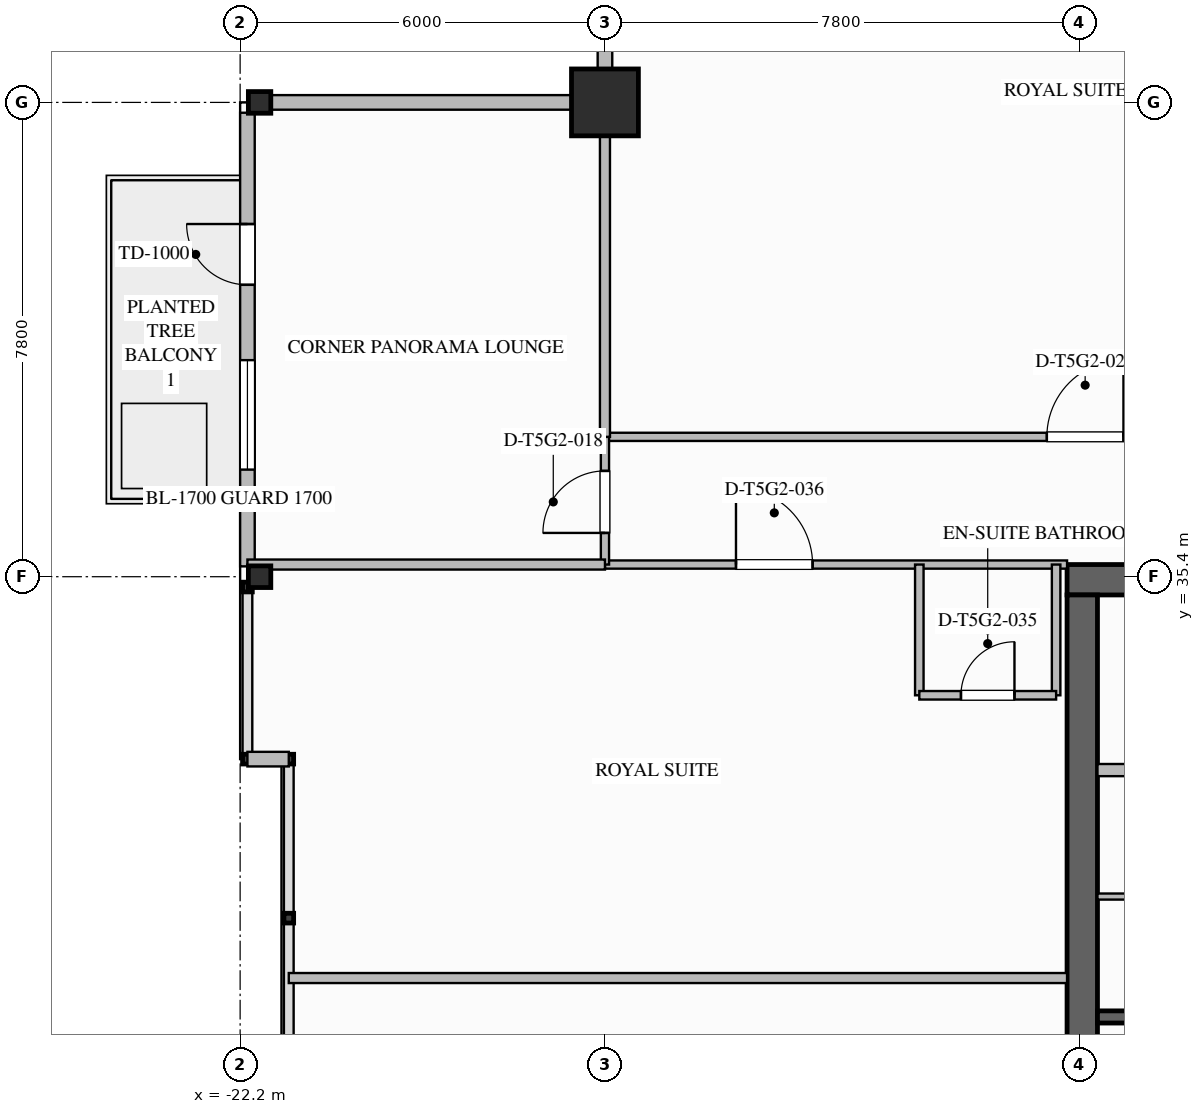
"""IFC4 building model, lengths in metres.
Left out: names, types, materials, properties, quantities, classifications, styles, units other than length and angle.
Written with IfcOpenShell. Run it as: python <this file> out.ifc"""

import sys

from ifc_helpers import new_model, si_unit, direction, frame, frame_2d, origin, origin_2d, place, context, subcontext, project, spatial, rectangle, i_section, extrude, element, fill, save


model = new_model("IFC4")
c1 = context("Model", 3, precision=1e-05, world=origin(), true_north=direction((0.0, 1.0)))
c2 = subcontext(c1, "Body", "Model", "MODEL_VIEW")
j1 = project(units=[si_unit("LENGTHUNIT", "METRE"), si_unit("PLANEANGLEUNIT", "RADIAN")], contexts=[c1])
p1 = place(None, origin())
s1 = spatial("IfcSite", under=j1, at=p1, CompositionType="ELEMENT")
p2 = place(p1, origin())
s2 = spatial("IfcBuilding", under=s1, at=p2, CompositionType="ELEMENT")
p3 = place(p2, frame((0.0, 0.0, 275.95)))
s3 = spatial("IfcBuildingStorey", under=s2, at=p3, CompositionType="ELEMENT", Elevation=275.95)
p4 = place(p3, frame((-8.6, 35.35, 0.0), z_axis=(0.0, 0.0, 1.0), x_axis=(1.0, 0.0, 0.0)))
e1 = element("IfcWall", 1, at=p4, inside=s3, PredefinedType="SHEAR", context=c2, shape_type="SweptSolid", body=[
    extrude(rectangle(XDim=17.2, YDim=0.5, at=frame_2d((8.6, 0.0))), origin(), (0.0, 0.0, 1.0), 3.65),
])
p5 = place(p3, frame((-8.35, 18.9, 0.0), z_axis=(0.0, 0.0, 1.0), x_axis=(0.0, 1.0, 0.0)))
e2 = element("IfcWall", 2, at=p5, inside=s3, PredefinedType="SHEAR", context=c2, shape_type="SweptSolid", body=[
    extrude(rectangle(XDim=16.2, YDim=0.5, at=frame_2d((8.1, 0.0))), origin(), (0.0, 0.0, 1.0), 3.65),
])
p6 = place(p3, frame((-16.2, 43.2, 0.0), z_axis=(0.0, 0.0, 1.0), x_axis=(1.0, 0.0, 0.0)))
e3 = element("IfcColumn", 3, at=p6, inside=s3, PredefinedType="COLUMN", context=c2, shape_type="SweptSolid", body=[
    extrude(rectangle(XDim=1.1, YDim=1.1, at=origin_2d()), origin(), (0.0, 0.0, 1.0), 3.65),
])
for number, where, z_axis, x_axis in (
    (4, (-21.88, 35.4, 0.0), (0.0, 0.0, 1.0), (1.0, 0.0, 0.0)),
    (5, (-21.88, 43.2, 0.0), (0.0, 0.0, 1.0), (1.0, 0.0, 0.0)),
):
    element("IfcColumn", number, at=place(p3, frame(where, z_axis=z_axis, x_axis=x_axis)), inside=s3, PredefinedType="COLUMN", context=c2, shape_type="SweptSolid", body=[
        extrude(i_section(OverallWidth=0.369, OverallDepth=0.356, WebThickness=0.011, FlangeThickness=0.018, FilletRadius=0.025, at=origin_2d()), origin(), (0.0, 0.0, 1.0), 3.647),
    ])
p7 = place(p3, frame((-22.08, 35.57, 0.0), z_axis=(0.0, 0.0, 1.0), x_axis=(0.0, 1.0, 0.0)))
e6 = element("IfcWall", 6, at=p7, inside=s3, PredefinedType="STANDARD", context=c2, shape_type="SweptSolid", body=[
    extrude(rectangle(XDim=7.46, YDim=0.24, at=frame_2d((3.73, 0.0))), origin(), (0.0, 0.0, 1.0), 2.853),
])
p8 = place(p7, frame((4.63, 0.0, 0.0)))
e7 = element("IfcOpeningElement", 7, at=p8, cuts=e6, PredefinedType="OPENING", context=c2, shape_type="SweptSolid", body=[
    extrude(rectangle(XDim=1.0, YDim=2.2, at=frame_2d((0.5, 1.1))), frame((0.0, 0.13, 0.0), z_axis=(0.0, -1.0, 0.0), x_axis=(1.0, 0.0, 0.0)), (0.0, 0.0, 1.0), 0.26),
])
p9 = place(p7, frame((1.592, 0.0, 0.75)))
e8 = element("IfcOpeningElement", 8, at=p9, cuts=e6, PredefinedType="OPENING", context=c2, shape_type="SweptSolid", body=[
    extrude(rectangle(XDim=1.8, YDim=2.003, at=frame_2d((0.9, 1.001))), frame((0.0, 0.13, 0.0), z_axis=(0.0, -1.0, 0.0), x_axis=(1.0, 0.0, 0.0)), (0.0, 0.0, 1.0), 0.26),
])
for number, where, z_axis, x_axis in (
    (9, (-22.08, 43.2, 0.0), (0.0, 0.0, 1.0), (1.0, 0.0, 0.0)),
    (10, (-16.2, 43.2, 0.0), (0.0, 0.0, 1.0), (0.0, 1.0, 0.0)),
):
    element("IfcWall", number, at=place(p3, frame(where, z_axis=z_axis, x_axis=x_axis)), inside=s3, PredefinedType="STANDARD", context=c2, shape_type="SweptSolid", body=[
        extrude(rectangle(XDim=5.88, YDim=0.24, at=frame_2d((2.94, 0.0))), origin(), (0.0, 0.0, 1.0), 2.779),
    ])
p10 = place(p3, frame((-21.4, 32.4, 0.0), z_axis=(0.0, 0.0, 1.0), x_axis=(-1.0, 0.0, 0.0)))
e11 = element("IfcWall", 11, at=p10, inside=s3, PredefinedType="STANDARD", context=c2, shape_type="SweptSolid", body=[
    extrude(rectangle(XDim=0.68, YDim=0.24, at=frame_2d((0.34, 0.0))), origin(), (0.0, 0.0, 1.0), 3.39),
])
p11 = place(p3, frame((-8.1, 28.16, 0.0), z_axis=(0.0, 0.0, 1.0), x_axis=(1.0, 0.0, 0.0)))
e12 = element("IfcWall", 12, at=p11, inside=s3, PredefinedType="SOLIDWALL", context=c2, shape_type="SweptSolid", body=[
    extrude(rectangle(XDim=8.1, YDim=0.2, at=frame_2d((4.05, 0.0))), origin(), (0.0, 0.0, 1.0), 3.39),
])
p12 = place(p3, frame((-8.1, 32.22, 0.0), z_axis=(0.0, 0.0, 1.0), x_axis=(1.0, 0.0, 0.0)))
e13 = element("IfcWall", 13, at=p12, inside=s3, PredefinedType="SOLIDWALL", context=c2, shape_type="SweptSolid", body=[
    extrude(rectangle(XDim=7.1, YDim=0.2, at=frame_2d((3.55, 0.0))), origin(), (0.0, 0.0, 1.0), 3.39),
])
p13 = place(p12, frame((0.95, 0.0, 0.0)))
e14 = element("IfcOpeningElement", 14, at=p13, cuts=e13, PredefinedType="OPENING", context=c2, shape_type="SweptSolid", body=[
    extrude(rectangle(XDim=1.1, YDim=2.2, at=frame_2d((0.55, 1.1))), frame((0.0, 0.11, 0.0), z_axis=(0.0, -1.0, 0.0), x_axis=(1.0, 0.0, 0.0)), (0.0, 0.0, 1.0), 0.22),
])
p14 = place(p12, frame((3.27, 0.0, 0.0)))
e15 = element("IfcOpeningElement", 15, at=p14, cuts=e13, PredefinedType="OPENING", context=c2, shape_type="SweptSolid", body=[
    extrude(rectangle(XDim=1.1, YDim=2.2, at=frame_2d((0.55, 1.1))), frame((0.0, 0.11, 0.0), z_axis=(0.0, -1.0, 0.0), x_axis=(1.0, 0.0, 0.0)), (0.0, 0.0, 1.0), 0.22),
])
p15 = place(p12, frame((5.59, 0.0, 0.0)))
e16 = element("IfcOpeningElement", 16, at=p15, cuts=e13, PredefinedType="OPENING", context=c2, shape_type="SweptSolid", body=[
    extrude(rectangle(XDim=1.1, YDim=2.2, at=frame_2d((0.55, 1.1))), frame((0.0, 0.11, 0.0), z_axis=(0.0, -1.0, 0.0), x_axis=(1.0, 0.0, 0.0)), (0.0, 0.0, 1.0), 0.22),
])
p16 = place(p3, frame((-8.1, 30.14, 0.0), z_axis=(0.0, 0.0, 1.0), x_axis=(1.0, 0.0, 0.0)))
e17 = element("IfcWall", 17, at=p16, inside=s3, PredefinedType="PARTITIONING", context=c2, shape_type="SweptSolid", body=[
    extrude(rectangle(XDim=7.1, YDim=0.1, at=frame_2d((3.55, 0.0))), origin(), (0.0, 0.0, 1.0), 3.39),
])
p17 = place(p16, frame((2.8, 0.0, 0.0)))
e18 = element("IfcOpeningElement", 18, at=p17, cuts=e17, PredefinedType="OPENING", context=c2, shape_type="SweptSolid", body=[
    extrude(rectangle(XDim=0.92, YDim=2.1, at=frame_2d((0.46, 1.05))), frame((0.0, 0.06, 0.0), z_axis=(0.0, -1.0, 0.0), x_axis=(1.0, 0.0, 0.0)), (0.0, 0.0, 1.0), 0.12),
])
p18 = place(p3, frame((-16.2, 37.7, 0.0), z_axis=(0.0, 0.0, 1.0), x_axis=(1.0, 0.0, 0.0)))
e19 = element("IfcWall", 19, at=p18, inside=s3, PredefinedType="PARTITIONING", context=c2, shape_type="SweptSolid", body=[
    extrude(rectangle(XDim=38.28, YDim=0.135, at=frame_2d((19.14, 0.0))), origin(), (0.0, 0.0, 1.0), 3.39),
])
p19 = place(p18, frame((33.355, 0.0, 0.0)))
e20 = element("IfcOpeningElement", 20, at=p19, cuts=e19, PredefinedType="OPENING", context=c2, shape_type="SweptSolid", body=[
    extrude(rectangle(XDim=1.26, YDim=2.2, at=frame_2d((0.63, 1.1))), frame((0.0, 0.077, 0.0), z_axis=(0.0, -1.0, 0.0), x_axis=(1.0, 0.0, 0.0)), (0.0, 0.0, 1.0), 0.155),
])
p20 = place(p18, frame((7.268, 0.0, 0.0)))
e21 = element("IfcOpeningElement", 21, at=p20, cuts=e19, PredefinedType="OPENING", context=c2, shape_type="SweptSolid", body=[
    extrude(rectangle(XDim=1.26, YDim=2.2, at=frame_2d((0.63, 1.1))), frame((0.0, 0.077, 0.0), z_axis=(0.0, -1.0, 0.0), x_axis=(1.0, 0.0, 0.0)), (0.0, 0.0, 1.0), 0.155),
])
p21 = place(p18, frame((23.468, 0.0, 0.0)))
e22 = element("IfcOpeningElement", 22, at=p21, cuts=e19, PredefinedType="OPENING", context=c2, shape_type="SweptSolid", body=[
    extrude(rectangle(XDim=1.26, YDim=2.2, at=frame_2d((0.63, 1.1))), frame((0.0, 0.077, 0.0), z_axis=(0.0, -1.0, 0.0), x_axis=(1.0, 0.0, 0.0)), (0.0, 0.0, 1.0), 0.155),
])
p22 = place(p3, frame((-16.2, 35.6, 0.0), z_axis=(0.0, 0.0, 1.0), x_axis=(1.0, 0.0, 0.0)))
e23 = element("IfcWall", 23, at=p22, inside=s3, PredefinedType="PARTITIONING", context=c2, shape_type="SweptSolid", body=[
    extrude(rectangle(XDim=7.6, YDim=0.135, at=frame_2d((3.8, 0.0))), origin(), (0.0, 0.0, 1.0), 2.767),
])
p23 = place(p22, frame((2.155, 0.0, 0.0)))
e24 = element("IfcOpeningElement", 24, at=p23, cuts=e23, PredefinedType="OPENING", context=c2, shape_type="SweptSolid", body=[
    extrude(rectangle(XDim=1.26, YDim=2.2, at=frame_2d((0.63, 1.1))), frame((0.0, 0.077, 0.0), z_axis=(0.0, -1.0, 0.0), x_axis=(1.0, 0.0, 0.0)), (0.0, 0.0, 1.0), 0.155),
])
p24 = place(p3, frame((-16.2, 35.6, 0.0), z_axis=(0.0, 0.0, 1.0), x_axis=(0.0, 1.0, 0.0)))
e25 = element("IfcWall", 25, at=p24, inside=s3, PredefinedType="PARTITIONING", context=c2, shape_type="SweptSolid", body=[
    extrude(rectangle(XDim=2.1, YDim=0.135, at=frame_2d((1.05, 0.0))), origin(), (0.0, 0.0, 1.0), 2.764),
])
p25 = place(p24, frame((0.52, 0.0, 0.0)))
e26 = element("IfcOpeningElement", 26, at=p25, cuts=e25, PredefinedType="OPENING", context=c2, shape_type="SweptSolid", body=[
    extrude(rectangle(XDim=1.02, YDim=2.15, at=frame_2d((0.51, 1.075))), frame((0.0, 0.077, 0.0), z_axis=(0.0, -1.0, 0.0), x_axis=(1.0, 0.0, 0.0)), (0.0, 0.0, 1.0), 0.155),
])
p26 = place(p3, frame((-16.2, 37.7, 0.0), z_axis=(0.0, 0.0, 1.0), x_axis=(0.0, 1.0, 0.0)))
e27 = element("IfcWall", 27, at=p26, inside=s3, PredefinedType="PARTITIONING", context=c2, shape_type="SweptSolid", body=[
    extrude(rectangle(XDim=5.38, YDim=0.165, at=frame_2d((2.69, 0.0))), origin(), (0.0, 0.0, 1.0), 2.764),
])
p27 = place(p3, frame((-22.08, 35.6, 0.0), z_axis=(0.0, 0.0, 1.0), x_axis=(1.0, 0.0, 0.0)))
e28 = element("IfcWall", 28, at=p27, inside=s3, PredefinedType="PARTITIONING", context=c2, shape_type="SweptSolid", body=[
    extrude(rectangle(XDim=5.88, YDim=0.165, at=frame_2d((2.94, 0.0))), origin(), (0.0, 0.0, 1.0), 2.764),
])
p28 = place(p3, frame((-21.4, 28.8, 0.0), z_axis=(0.0, 0.0, 1.0), x_axis=(1.0, 0.0, 0.0)))
e29 = element("IfcWall", 29, at=p28, inside=s3, PredefinedType="PARTITIONING", context=c2, shape_type="SweptSolid", body=[
    extrude(rectangle(XDim=12.8, YDim=0.165, at=frame_2d((6.4, 0.0))), origin(), (0.0, 0.0, 1.0), 3.39),
])
for number, where, z_axis, x_axis in (
    (30, (-11.03, 35.6, 0.0), (0.0, 0.0, 1.0), (0.0, -1.0, 0.0)),
    (31, (-8.78, 35.6, 0.0), (0.0, 0.0, 1.0), (0.0, -1.0, 0.0)),
):
    element("IfcWall", number, at=place(p3, frame(where, z_axis=z_axis, x_axis=x_axis)), inside=s3, PredefinedType="PLUMBINGWALL", context=c2, shape_type="SweptSolid", body=[
        extrude(rectangle(XDim=2.15, YDim=0.14, at=frame_2d((1.075, 0.0))), origin(), (0.0, 0.0, 1.0), 3.39),
    ])
p29 = place(p3, frame((-11.03, 33.45, 0.0), z_axis=(0.0, 0.0, 1.0), x_axis=(1.0, 0.0, 0.0)))
e32 = element("IfcWall", 32, at=p29, inside=s3, PredefinedType="PLUMBINGWALL", context=c2, shape_type="SweptSolid", body=[
    extrude(rectangle(XDim=2.25, YDim=0.14, at=frame_2d((1.125, 0.0))), origin(), (0.0, 0.0, 1.0), 3.39),
])
p30 = place(p29, frame((0.685, 0.0, 0.0)))
e33 = element("IfcOpeningElement", 33, at=p30, cuts=e32, PredefinedType="OPENING", context=c2, shape_type="SweptSolid", body=[
    extrude(rectangle(XDim=0.88, YDim=2.1, at=frame_2d((0.44, 1.05))), frame((0.0, 0.08, 0.0), z_axis=(0.0, -1.0, 0.0), x_axis=(1.0, 0.0, 0.0)), (0.0, 0.0, 1.0), 0.16),
])
p31 = place(p8, origin())
e34 = element("IfcDoor", 34, at=p31, inside=s3, OperationType="SINGLE_SWING_RIGHT", PredefinedType="DOOR", context=c2, shape_type="SweptSolid", body=[
    extrude(rectangle(XDim=1.0, YDim=2.2, at=frame_2d((0.5, 1.1))), frame((0.0, 0.025, 0.0), z_axis=(0.0, -1.0, 0.0), x_axis=(1.0, 0.0, 0.0)), (0.0, 0.0, 1.0), 0.05),
])
fill(e7, e34)
p32 = place(p9, origin())
e35 = element("IfcWindow", 35, at=p32, inside=s3, PartitioningType="SINGLE_PANEL", PredefinedType="WINDOW", context=c2, shape_type="SweptSolid", body=[
    extrude(rectangle(XDim=1.8, YDim=2.003, at=frame_2d((0.9, 1.001))), frame((0.0, 0.03, 0.0), z_axis=(0.0, -1.0, 0.0), x_axis=(1.0, 0.0, 0.0)), (0.0, 0.0, 1.0), 0.06),
])
fill(e8, e35)
p33 = place(p25, origin())
e36 = element("IfcDoor", 36, at=p33, inside=s3, OperationType="SINGLE_SWING_LEFT", PredefinedType="DOOR", context=c2, shape_type="SweptSolid", body=[
    extrude(rectangle(XDim=1.02, YDim=2.15, at=frame_2d((0.51, 1.075))), frame((0.0, 0.025, 0.0), z_axis=(0.0, -1.0, 0.0), x_axis=(1.0, 0.0, 0.0)), (0.0, 0.0, 1.0), 0.05),
])
fill(e26, e36)
p34 = place(p20, origin())
e37 = element("IfcDoor", 37, at=p34, inside=s3, OperationType="SINGLE_SWING_RIGHT", PredefinedType="DOOR", context=c2, shape_type="SweptSolid", body=[
    extrude(rectangle(XDim=1.26, YDim=2.2, at=frame_2d((0.63, 1.1))), frame((0.0, 0.025, 0.0), z_axis=(0.0, -1.0, 0.0), x_axis=(1.0, 0.0, 0.0)), (0.0, 0.0, 1.0), 0.05),
])
fill(e21, e37)
p35 = place(p30, origin())
e38 = element("IfcDoor", 38, at=p35, inside=s3, OperationType="SINGLE_SWING_RIGHT", PredefinedType="DOOR", context=c2, shape_type="SweptSolid", body=[
    extrude(rectangle(XDim=0.88, YDim=2.1, at=frame_2d((0.44, 1.05))), frame((0.0, 0.025, 0.0), z_axis=(0.0, -1.0, 0.0), x_axis=(1.0, 0.0, 0.0)), (0.0, 0.0, 1.0), 0.05),
])
fill(e33, e38)
p36 = place(p23, origin())
e39 = element("IfcDoor", 39, at=p36, inside=s3, OperationType="SINGLE_SWING_LEFT", PredefinedType="DOOR", context=c2, shape_type="SweptSolid", body=[
    extrude(rectangle(XDim=1.26, YDim=2.2, at=frame_2d((0.63, 1.1))), frame((0.0, 0.025, 0.0), z_axis=(0.0, -1.0, 0.0), x_axis=(1.0, 0.0, 0.0)), (0.0, 0.0, 1.0), 0.05),
])
fill(e24, e39)
save(model, sys.argv[1])
